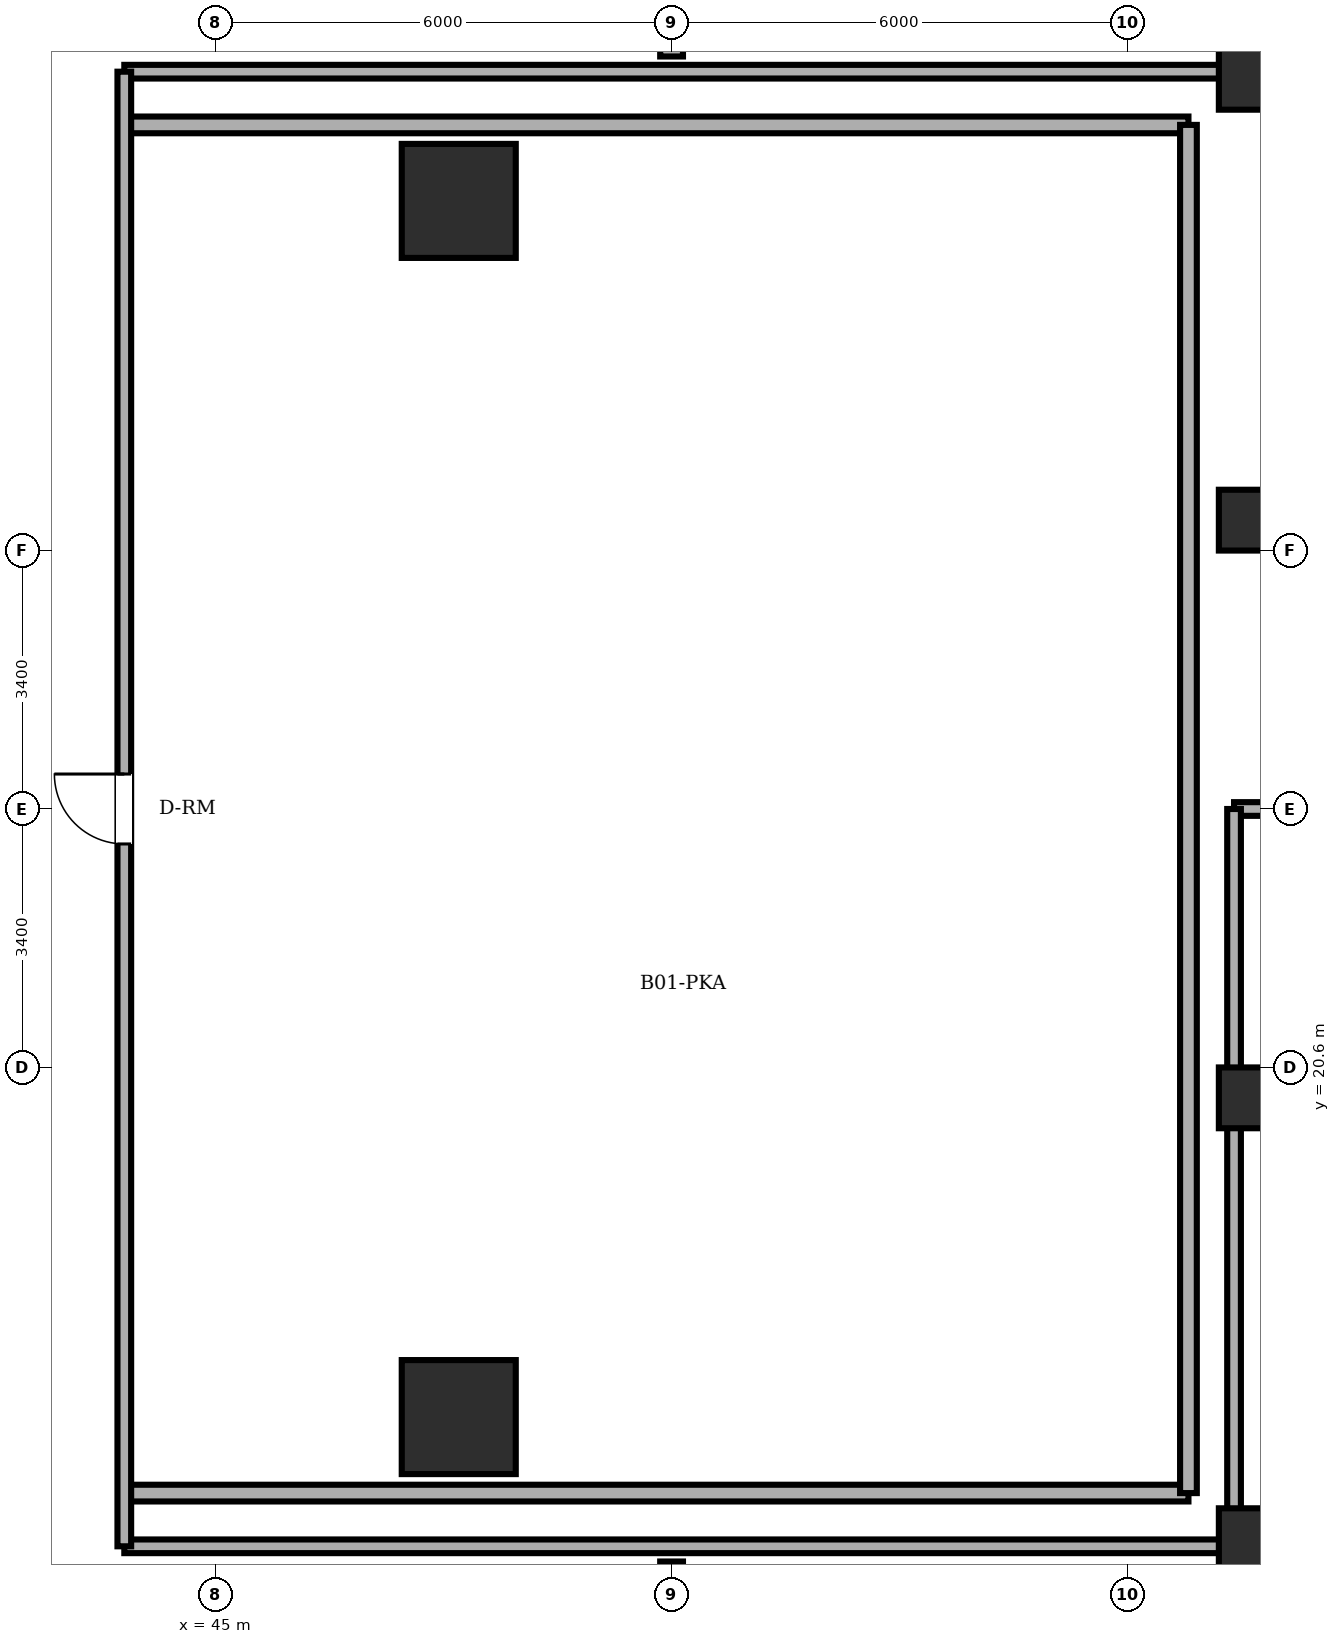
"""IFC4 building model, lengths in metres.
Left out: names, types, materials, properties, quantities, classifications, styles, units other than length and angle.
Written with IfcOpenShell. Run it as: python <this file> out.ifc"""

import sys

from ifc_helpers import new_model, si_unit, direction, frame, frame_2d, origin, origin_2d, place, context, subcontext, project, spatial, rectangle, circle, extrude, element, fill, save


model = new_model("IFC4")
c1 = context("Model", 3, precision=1e-05, world=origin(), true_north=direction((0.0, 1.0)))
c2 = subcontext(c1, "Body", "Model", "MODEL_VIEW")
j1 = project(units=[si_unit("LENGTHUNIT", "METRE"), si_unit("PLANEANGLEUNIT", "RADIAN")], contexts=[c1])
p1 = place(None, origin())
s1 = spatial("IfcSite", under=j1, at=p1, CompositionType="ELEMENT")
p2 = place(p1, origin())
s2 = spatial("IfcBuilding", under=s1, at=p2, CompositionType="ELEMENT")
p3 = place(p2, frame((0.0, 0.0, -4.2)))
s3 = spatial("IfcBuildingStorey", under=s2, at=p3, CompositionType="ELEMENT", Elevation=-4.2)
for number, where, z_axis, x_axis in (
    (1, (48.2, 16.0, 0.0), (0.0, 0.0, 1.0), (1.0, 0.0, 0.0)),
    (2, (48.2, 32.0, 0.0), (0.0, 0.0, 1.0), (1.0, 0.0, 0.0)),
):
    element("IfcColumn", number, at=place(p3, frame(where, z_axis=z_axis, x_axis=x_axis)), inside=s3, PredefinedType="COLUMN", context=c2, shape_type="SweptSolid", body=[
        extrude(circle(Radius=0.75, at=origin_2d()), origin(), (0.0, 0.0, 1.0), 4.2),
    ])
for number, where, z_axis, x_axis in (
    (3, (58.6, 20.2, 0.0), (0.0, 0.0, 1.0), (1.0, 0.0, 0.0)),
    (4, (58.6, 27.8, 0.0), (0.0, 0.0, 1.0), (1.0, 0.0, 0.0)),
    (5, (58.6, 14.4, 0.0), (0.0, 0.0, 1.0), (1.0, 0.0, 0.0)),
    (6, (58.6, 33.6, 0.0), (0.0, 0.0, 1.0), (1.0, 0.0, 0.0)),
):
    element("IfcColumn", number, at=place(p3, frame(where, z_axis=z_axis, x_axis=x_axis)), inside=s3, PredefinedType="COLUMN", context=c2, shape_type="SweptSolid", body=[
        extrude(rectangle(XDim=0.8, YDim=0.8, at=origin_2d()), origin(), (0.0, 0.0, 1.0), 4.2),
    ])
p4 = place(p3, frame((43.8, 14.3, 0.0), z_axis=(0.0, 0.0, 1.0), x_axis=(1.0, 0.0, 0.0)))
e7 = element("IfcWall", 7, at=p4, inside=s3, PredefinedType="PARTITIONING", context=c2, shape_type="SweptSolid", body=[
    extrude(rectangle(XDim=14.6, YDim=0.18, at=frame_2d((7.3, 0.0))), origin(), (0.0, 0.0, 1.0), 3.96),
])
p5 = place(p3, frame((43.8, 15.0, 0.0), z_axis=(0.0, 0.0, 1.0), x_axis=(1.0, 0.0, 0.0)))
e8 = element("IfcWall", 8, at=p5, inside=s3, PredefinedType="PARTITIONING", context=c2, shape_type="SweptSolid", body=[
    extrude(rectangle(XDim=14.0, YDim=0.22, at=frame_2d((7.0, 0.0))), origin(), (0.0, 0.0, 1.0), 3.96),
])
p6 = place(p3, frame((58.4, 24.0, 0.0), z_axis=(0.0, 0.0, 1.0), x_axis=(1.0, 0.0, 0.0)))
e9 = element("IfcWall", 9, at=p6, inside=s3, PredefinedType="PARTITIONING", context=c2, shape_type="SweptSolid", body=[
    extrude(rectangle(XDim=6.5, YDim=0.18, at=frame_2d((3.25, 0.0))), origin(), (0.0, 0.0, 1.0), 3.96),
])
p7 = place(p3, frame((43.8, 33.0, 0.0), z_axis=(0.0, 0.0, 1.0), x_axis=(1.0, 0.0, 0.0)))
e10 = element("IfcWall", 10, at=p7, inside=s3, PredefinedType="PARTITIONING", context=c2, shape_type="SweptSolid", body=[
    extrude(rectangle(XDim=14.0, YDim=0.22, at=frame_2d((7.0, 0.0))), origin(), (0.0, 0.0, 1.0), 3.96),
])
p8 = place(p3, frame((43.8, 33.7, 0.0), z_axis=(0.0, 0.0, 1.0), x_axis=(1.0, 0.0, 0.0)))
e11 = element("IfcWall", 11, at=p8, inside=s3, PredefinedType="PARTITIONING", context=c2, shape_type="SweptSolid", body=[
    extrude(rectangle(XDim=14.6, YDim=0.18, at=frame_2d((7.3, 0.0))), origin(), (0.0, 0.0, 1.0), 3.96),
])
p9 = place(p3, frame((43.8, 14.3, 0.0), z_axis=(0.0, 0.0, 1.0), x_axis=(0.0, 1.0, 0.0)))
e12 = element("IfcWall", 12, at=p9, inside=s3, PredefinedType="PARTITIONING", context=c2, shape_type="SweptSolid", body=[
    extrude(rectangle(XDim=19.4, YDim=0.18, at=frame_2d((9.7, 0.0))), origin(), (0.0, 0.0, 1.0), 3.96),
])
p10 = place(p9, frame((9.24, 0.0, 0.0)))
e13 = element("IfcOpeningElement", 13, at=p10, cuts=e12, PredefinedType="OPENING", context=c2, shape_type="SweptSolid", body=[
    extrude(rectangle(XDim=0.92, YDim=2.1, at=frame_2d((0.46, 1.05))), frame((0.0, 0.1, 0.0), z_axis=(0.0, -1.0, 0.0), x_axis=(1.0, 0.0, 0.0)), (0.0, 0.0, 1.0), 0.2),
])
p11 = place(p3, frame((57.8, 15.0, 0.0), z_axis=(0.0, 0.0, 1.0), x_axis=(0.0, 1.0, 0.0)))
e14 = element("IfcWall", 14, at=p11, inside=s3, PredefinedType="PARTITIONING", context=c2, shape_type="SweptSolid", body=[
    extrude(rectangle(XDim=18.0, YDim=0.22, at=frame_2d((9.0, 0.0))), origin(), (0.0, 0.0, 1.0), 3.96),
])
p12 = place(p3, frame((58.4, 14.3, 0.0), z_axis=(0.0, 0.0, 1.0), x_axis=(0.0, 1.0, 0.0)))
e15 = element("IfcWall", 15, at=p12, inside=s3, PredefinedType="PARTITIONING", context=c2, shape_type="SweptSolid", body=[
    extrude(rectangle(XDim=9.7, YDim=0.18, at=frame_2d((4.85, 0.0))), origin(), (0.0, 0.0, 1.0), 2.742),
])
p13 = place(p3, frame((58.4, 33.7, 0.0), z_axis=(0.0, 0.0, 1.0), x_axis=(0.0, 1.0, 0.0)))
e16 = element("IfcWall", 16, at=p13, inside=s3, PredefinedType="PARTITIONING", context=c2, shape_type="SweptSolid", body=[
    extrude(rectangle(XDim=6.1, YDim=0.18, at=frame_2d((3.05, 0.0))), origin(), (0.0, 0.0, 1.0), 2.742),
])
p14 = place(p3, frame((51.0, 8.4, 0.0), z_axis=(0.0, 0.0, 1.0), x_axis=(0.0, 1.0, 0.0)))
e17 = element("IfcWall", 17, at=p14, inside=s3, PredefinedType="SOLIDWALL", context=c2, shape_type="SweptSolid", body=[
    extrude(rectangle(XDim=5.7, YDim=0.3, at=frame_2d((2.85, 0.0))), origin(), (0.0, 0.0, 1.0), 3.96),
])
p15 = place(p14, frame((1.35, 0.0, 0.0)))
e18 = element("IfcOpeningElement", 18, at=p15, cuts=e17, PredefinedType="OPENING", context=c2, shape_type="SweptSolid", body=[
    extrude(rectangle(XDim=3.0, YDim=2.55, at=frame_2d((1.5, 1.275))), frame((0.0, 0.16, 0.0), z_axis=(0.0, -1.0, 0.0), x_axis=(1.0, 0.0, 0.0)), (0.0, 0.0, 1.0), 0.32),
])
p16 = place(p3, frame((51.0, 33.9, 0.0), z_axis=(0.0, 0.0, 1.0), x_axis=(0.0, 1.0, 0.0)))
e19 = element("IfcWall", 19, at=p16, inside=s3, PredefinedType="SOLIDWALL", context=c2, shape_type="SweptSolid", body=[
    extrude(rectangle(XDim=5.7, YDim=0.3, at=frame_2d((2.85, 0.0))), origin(), (0.0, 0.0, 1.0), 3.96),
])
p17 = place(p16, frame((1.35, 0.0, 0.0)))
e20 = element("IfcOpeningElement", 20, at=p17, cuts=e19, PredefinedType="OPENING", context=c2, shape_type="SweptSolid", body=[
    extrude(rectangle(XDim=3.0, YDim=2.55, at=frame_2d((1.5, 1.275))), frame((0.0, 0.16, 0.0), z_axis=(0.0, -1.0, 0.0), x_axis=(1.0, 0.0, 0.0)), (0.0, 0.0, 1.0), 0.32),
])
p18 = place(p10, origin())
e21 = element("IfcDoor", 21, at=p18, inside=s3, OperationType="SINGLE_SWING_RIGHT", PredefinedType="DOOR", context=c2, shape_type="SweptSolid", body=[
    extrude(rectangle(XDim=0.92, YDim=2.1, at=frame_2d((0.46, 1.05))), frame((0.0, 0.025, 0.0), z_axis=(0.0, -1.0, 0.0), x_axis=(1.0, 0.0, 0.0)), (0.0, 0.0, 1.0), 0.05),
])
fill(e13, e21)
save(model, sys.argv[1])
